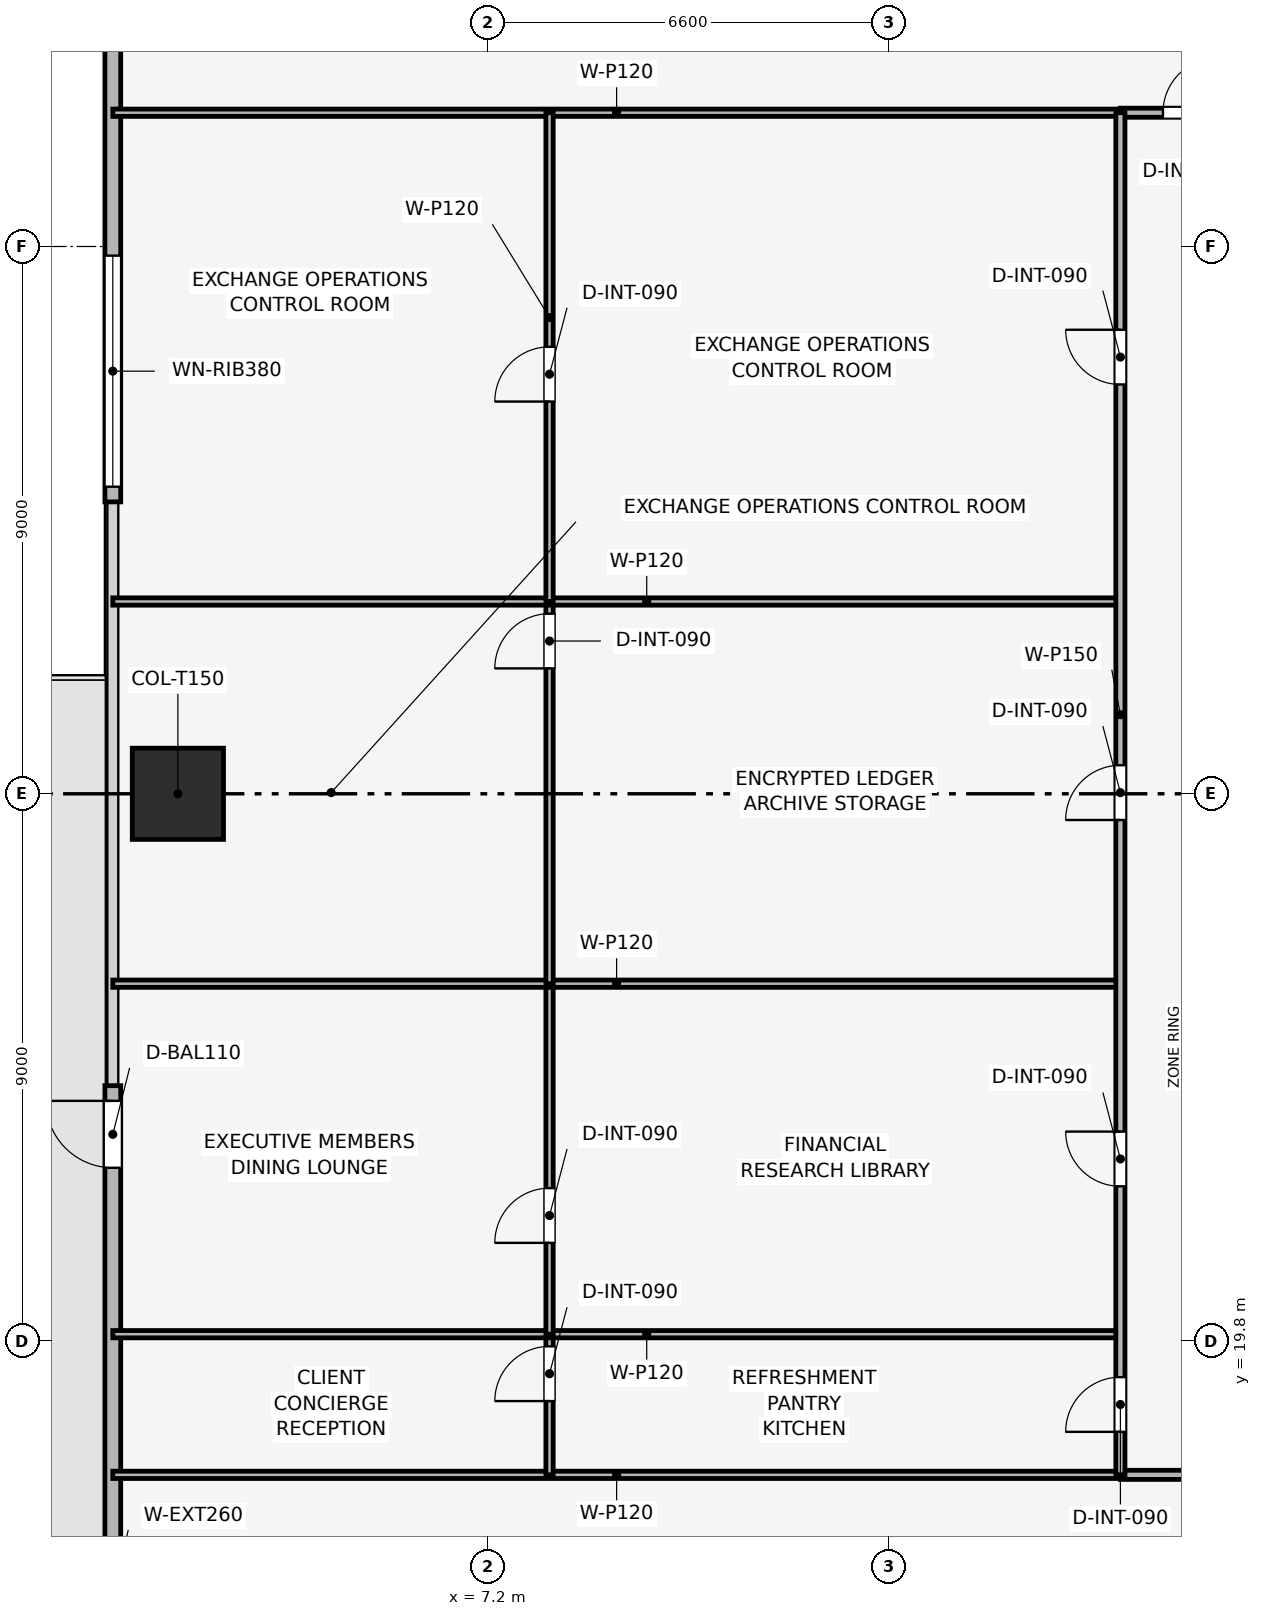
"""IFC4 building model, lengths in metres.
Left out: names, types, materials, properties, quantities, classifications, styles, units other than length and angle.
Written with IfcOpenShell. Run it as: python <this file> out.ifc"""

import sys

from ifc_helpers import new_model, si_unit, direction, frame, frame_2d, origin, origin_2d, place, context, subcontext, project, spatial, rectangle, extrude, element, fill, save


model = new_model("IFC4")
c1 = context("Model", 3, precision=1e-05, world=origin(), true_north=direction((0.0, 1.0)))
c2 = subcontext(c1, "Body", "Model", "MODEL_VIEW")
j1 = project(units=[si_unit("LENGTHUNIT", "METRE"), si_unit("PLANEANGLEUNIT", "RADIAN")], contexts=[c1])
p1 = place(None, origin())
s1 = spatial("IfcSite", under=j1, at=p1, CompositionType="ELEMENT")
p2 = place(p1, origin())
s2 = spatial("IfcBuilding", under=s1, at=p2, CompositionType="ELEMENT")
p3 = place(p2, frame((0.0, 0.0, 80.7)))
s3 = spatial("IfcBuildingStorey", under=s2, at=p3, CompositionType="ELEMENT", Elevation=80.7)
p4 = place(p3, frame((2.1, 28.8, 0.003), z_axis=(0.0, 0.0, 1.0), x_axis=(1.0, 0.0, 0.0)))
e1 = element("IfcColumn", 1, at=p4, inside=s3, PredefinedType="COLUMN", context=c2, shape_type="SweptSolid", body=[
    extrude(rectangle(XDim=1.5, YDim=1.5, at=origin_2d()), origin(), (0.0, 0.0, 1.0), 3.644),
])
p5 = place(p3, frame((1.03, 8.7, 0.0), z_axis=(0.0, 0.0, 1.0), x_axis=(0.0, 1.0, 0.0)))
e2 = element("IfcWall", 2, at=p5, inside=s3, PredefinedType="SOLIDWALL", context=c2, shape_type="SweptSolid", body=[
    extrude(rectangle(XDim=15.3, YDim=0.26, at=frame_2d((7.65, 0.0))), origin(), (0.0, 0.0, 1.0), 3.65),
])
p6 = place(p5, frame((13.95, 0.0, 0.0)))
e3 = element("IfcOpeningElement", 3, at=p6, cuts=e2, PredefinedType="OPENING", context=c2, shape_type="SweptSolid", body=[
    extrude(rectangle(XDim=1.1, YDim=2.2, at=frame_2d((0.55, 1.1))), frame((0.0, 0.14, 0.0), z_axis=(0.0, -1.0, 0.0), x_axis=(1.0, 0.0, 0.0)), (0.0, 0.0, 1.0), 0.28),
])
p7 = place(p3, frame((1.03, 33.6, 0.0), z_axis=(0.0, 0.0, 1.0), x_axis=(0.0, 1.0, 0.0)))
e4 = element("IfcWall", 4, at=p7, inside=s3, PredefinedType="SOLIDWALL", context=c2, shape_type="SweptSolid", body=[
    extrude(rectangle(XDim=15.3, YDim=0.26, at=frame_2d((7.65, 0.0))), origin(), (0.0, 0.0, 1.0), 3.65),
])
p8 = place(p7, frame((0.25, 0.0, 0.9)))
e5 = element("IfcOpeningElement", 5, at=p8, cuts=e4, PredefinedType="OPENING", context=c2, shape_type="SweptSolid", body=[
    extrude(rectangle(XDim=3.8, YDim=1.9, at=frame_2d((1.9, 0.95))), frame((0.0, 0.14, 0.0), z_axis=(0.0, -1.0, 0.0), x_axis=(1.0, 0.0, 0.0)), (0.0, 0.0, 1.0), 0.28),
])
for number, where, z_axis, x_axis in (
    (6, (1.03, 17.6, 0.0), (0.0, 0.0, 1.0), (1.0, 0.0, 0.0)),
    (7, (1.03, 40.0, 0.0), (0.0, 0.0, 1.0), (1.0, 0.0, 0.0)),
):
    element("IfcWall", number, at=place(p3, frame(where, z_axis=z_axis, x_axis=x_axis)), inside=s3, PredefinedType="PARTITIONING", context=c2, shape_type="SweptSolid", body=[
        extrude(rectangle(XDim=16.57, YDim=0.12, at=frame_2d((8.285, 0.0))), origin(), (0.0, 0.0, 1.0), 2.935),
    ])
p9 = place(p3, frame((8.212, 17.6, 0.0), z_axis=(0.0, 0.0, 1.0), x_axis=(0.0, 1.0, 0.0)))
e8 = element("IfcWall", 8, at=p9, inside=s3, PredefinedType="PARTITIONING", context=c2, shape_type="SweptSolid", body=[
    extrude(rectangle(XDim=2.313, YDim=0.12, at=frame_2d((1.156, 0.0))), origin(), (0.0, 0.0, 1.0), 3.65),
])
p10 = place(p9, frame((1.213, 0.0, 0.0)))
e9 = element("IfcOpeningElement", 9, at=p10, cuts=e8, PredefinedType="OPENING", context=c2, shape_type="SweptSolid", body=[
    extrude(rectangle(XDim=0.9, YDim=2.1, at=frame_2d((0.45, 1.05))), frame((0.0, 0.07, 0.0), z_axis=(0.0, -1.0, 0.0), x_axis=(1.0, 0.0, 0.0)), (0.0, 0.0, 1.0), 0.14),
])
p11 = place(p3, frame((1.03, 19.913, 0.0), z_axis=(0.0, 0.0, 1.0), x_axis=(1.0, 0.0, 0.0)))
e10 = element("IfcWall", 10, at=p11, inside=s3, PredefinedType="PARTITIONING", context=c2, shape_type="SweptSolid", body=[
    extrude(rectangle(XDim=16.57, YDim=0.12, at=frame_2d((8.285, 0.0))), origin(), (0.0, 0.0, 1.0), 2.935),
])
p12 = place(p3, frame((8.212, 19.913, 0.0), z_axis=(0.0, 0.0, 1.0), x_axis=(0.0, 1.0, 0.0)))
e11 = element("IfcWall", 11, at=p12, inside=s3, PredefinedType="PARTITIONING", context=c2, shape_type="SweptSolid", body=[
    extrude(rectangle(XDim=5.764, YDim=0.12, at=frame_2d((2.882, 0.0))), origin(), (0.0, 0.0, 1.0), 3.085),
])
p13 = place(p12, frame((1.502, 0.0, 0.0)))
e12 = element("IfcOpeningElement", 12, at=p13, cuts=e11, PredefinedType="OPENING", context=c2, shape_type="SweptSolid", body=[
    extrude(rectangle(XDim=0.9, YDim=2.1, at=frame_2d((0.45, 1.05))), frame((0.0, 0.07, 0.0), z_axis=(0.0, -1.0, 0.0), x_axis=(1.0, 0.0, 0.0)), (0.0, 0.0, 1.0), 0.14),
])
p14 = place(p3, frame((1.03, 25.677, 0.0), z_axis=(0.0, 0.0, 1.0), x_axis=(1.0, 0.0, 0.0)))
e13 = element("IfcWall", 13, at=p14, inside=s3, PredefinedType="PARTITIONING", context=c2, shape_type="SweptSolid", body=[
    extrude(rectangle(XDim=16.57, YDim=0.12, at=frame_2d((8.285, 0.0))), origin(), (0.0, 0.0, 1.0), 2.935),
])
p15 = place(p3, frame((8.212, 25.677, 0.0), z_axis=(0.0, 0.0, 1.0), x_axis=(0.0, 1.0, 0.0)))
e14 = element("IfcWall", 14, at=p15, inside=s3, PredefinedType="PARTITIONING", context=c2, shape_type="SweptSolid", body=[
    extrude(rectangle(XDim=6.285, YDim=0.12, at=frame_2d((3.143, 0.0))), origin(), (0.0, 0.0, 1.0), 3.085),
])
p16 = place(p15, frame((5.185, 0.0, 0.0)))
e15 = element("IfcOpeningElement", 15, at=p16, cuts=e14, PredefinedType="OPENING", context=c2, shape_type="SweptSolid", body=[
    extrude(rectangle(XDim=0.9, YDim=2.1, at=frame_2d((0.45, 1.05))), frame((0.0, 0.07, 0.0), z_axis=(0.0, -1.0, 0.0), x_axis=(1.0, 0.0, 0.0)), (0.0, 0.0, 1.0), 0.14),
])
p17 = place(p3, frame((1.03, 31.962, 0.0), z_axis=(0.0, 0.0, 1.0), x_axis=(1.0, 0.0, 0.0)))
e16 = element("IfcWall", 16, at=p17, inside=s3, PredefinedType="PARTITIONING", context=c2, shape_type="SweptSolid", body=[
    extrude(rectangle(XDim=16.57, YDim=0.12, at=frame_2d((8.285, 0.0))), origin(), (0.0, 0.0, 1.0), 2.935),
])
p18 = place(p3, frame((8.212, 31.962, 0.0), z_axis=(0.0, 0.0, 1.0), x_axis=(0.0, 1.0, 0.0)))
e17 = element("IfcWall", 17, at=p18, inside=s3, PredefinedType="PARTITIONING", context=c2, shape_type="SweptSolid", body=[
    extrude(rectangle(XDim=8.038, YDim=0.12, at=frame_2d((4.019, 0.0))), origin(), (0.0, 0.0, 1.0), 3.085),
])
p19 = place(p18, frame((3.288, 0.0, 0.0)))
e18 = element("IfcOpeningElement", 18, at=p19, cuts=e17, PredefinedType="OPENING", context=c2, shape_type="SweptSolid", body=[
    extrude(rectangle(XDim=0.9, YDim=2.1, at=frame_2d((0.45, 1.05))), frame((0.0, 0.07, 0.0), z_axis=(0.0, -1.0, 0.0), x_axis=(1.0, 0.0, 0.0)), (0.0, 0.0, 1.0), 0.14),
])
p20 = place(p3, frame((17.6, 17.6, 0.0), z_axis=(0.0, 0.0, 1.0), x_axis=(1.0, 0.0, 0.0)))
e19 = element("IfcWall", 19, at=p20, inside=s3, PredefinedType="PARTITIONING", context=c2, shape_type="SweptSolid", body=[
    extrude(rectangle(XDim=22.4, YDim=0.15, at=frame_2d((11.2, 0.0))), origin(), (0.0, 0.0, 1.0), 3.085),
])
p21 = place(p20, frame((2.4, 0.0, 0.0)))
e20 = element("IfcOpeningElement", 20, at=p21, cuts=e19, PredefinedType="OPENING", context=c2, shape_type="SweptSolid", body=[
    extrude(rectangle(XDim=0.9, YDim=2.1, at=frame_2d((0.45, 1.05))), frame((0.0, 0.085, 0.0), z_axis=(0.0, -1.0, 0.0), x_axis=(1.0, 0.0, 0.0)), (0.0, 0.0, 1.0), 0.17),
])
p22 = place(p20, frame((6.65, 0.0, 0.0)))
e21 = element("IfcOpeningElement", 21, at=p22, cuts=e19, PredefinedType="OPENING", context=c2, shape_type="SweptSolid", body=[
    extrude(rectangle(XDim=0.9, YDim=2.1, at=frame_2d((0.45, 1.05))), frame((0.0, 0.085, 0.0), z_axis=(0.0, -1.0, 0.0), x_axis=(1.0, 0.0, 0.0)), (0.0, 0.0, 1.0), 0.17),
])
p23 = place(p20, frame((9.55, 0.0, 0.0)))
e22 = element("IfcOpeningElement", 22, at=p23, cuts=e19, PredefinedType="OPENING", context=c2, shape_type="SweptSolid", body=[
    extrude(rectangle(XDim=0.9, YDim=2.1, at=frame_2d((0.45, 1.05))), frame((0.0, 0.085, 0.0), z_axis=(0.0, -1.0, 0.0), x_axis=(1.0, 0.0, 0.0)), (0.0, 0.0, 1.0), 0.17),
])
p24 = place(p20, frame((12.3, 0.0, 0.0)))
e23 = element("IfcOpeningElement", 23, at=p24, cuts=e19, PredefinedType="OPENING", context=c2, shape_type="SweptSolid", body=[
    extrude(rectangle(XDim=0.95, YDim=2.1, at=frame_2d((0.475, 1.05))), frame((0.0, 0.085, 0.0), z_axis=(0.0, -1.0, 0.0), x_axis=(1.0, 0.0, 0.0)), (0.0, 0.0, 1.0), 0.17),
])
p25 = place(p20, frame((17.8, 0.0, 0.0)))
e24 = element("IfcOpeningElement", 24, at=p25, cuts=e19, PredefinedType="OPENING", context=c2, shape_type="SweptSolid", body=[
    extrude(rectangle(XDim=0.9, YDim=2.1, at=frame_2d((0.45, 1.05))), frame((0.0, 0.085, 0.0), z_axis=(0.0, -1.0, 0.0), x_axis=(1.0, 0.0, 0.0)), (0.0, 0.0, 1.0), 0.17),
])
p26 = place(p3, frame((17.6, 40.0, 0.0), z_axis=(0.0, 0.0, 1.0), x_axis=(1.0, 0.0, 0.0)))
e25 = element("IfcWall", 25, at=p26, inside=s3, PredefinedType="PARTITIONING", context=c2, shape_type="SweptSolid", body=[
    extrude(rectangle(XDim=22.4, YDim=0.15, at=frame_2d((11.2, 0.0))), origin(), (0.0, 0.0, 1.0), 3.085),
])
p27 = place(p26, frame((0.7, 0.0, 0.0)))
e26 = element("IfcOpeningElement", 26, at=p27, cuts=e25, PredefinedType="OPENING", context=c2, shape_type="SweptSolid", body=[
    extrude(rectangle(XDim=0.9, YDim=2.1, at=frame_2d((0.45, 1.05))), frame((0.0, 0.085, 0.0), z_axis=(0.0, -1.0, 0.0), x_axis=(1.0, 0.0, 0.0)), (0.0, 0.0, 1.0), 0.17),
])
p28 = place(p26, frame((6.378, 0.0, 0.0)))
e27 = element("IfcOpeningElement", 27, at=p28, cuts=e25, PredefinedType="OPENING", context=c2, shape_type="SweptSolid", body=[
    extrude(rectangle(XDim=0.9, YDim=2.1, at=frame_2d((0.45, 1.05))), frame((0.0, 0.085, 0.0), z_axis=(0.0, -1.0, 0.0), x_axis=(1.0, 0.0, 0.0)), (0.0, 0.0, 1.0), 0.17),
])
p29 = place(p26, frame((16.428, 0.0, 0.0)))
e28 = element("IfcOpeningElement", 28, at=p29, cuts=e25, PredefinedType="OPENING", context=c2, shape_type="SweptSolid", body=[
    extrude(rectangle(XDim=0.9, YDim=2.1, at=frame_2d((0.45, 1.05))), frame((0.0, 0.085, 0.0), z_axis=(0.0, -1.0, 0.0), x_axis=(1.0, 0.0, 0.0)), (0.0, 0.0, 1.0), 0.17),
])
p30 = place(p3, frame((17.6, 17.6, 0.0), z_axis=(0.0, 0.0, 1.0), x_axis=(0.0, 1.0, 0.0)))
e29 = element("IfcWall", 29, at=p30, inside=s3, PredefinedType="PARTITIONING", context=c2, shape_type="SweptSolid", body=[
    extrude(rectangle(XDim=22.4, YDim=0.15, at=frame_2d((11.2, 0.0))), origin(), (0.0, 0.0, 1.0), 3.085),
])
p31 = place(p30, frame((0.707, 0.0, 0.0)))
e30 = element("IfcOpeningElement", 30, at=p31, cuts=e29, PredefinedType="OPENING", context=c2, shape_type="SweptSolid", body=[
    extrude(rectangle(XDim=0.9, YDim=2.1, at=frame_2d((0.45, 1.05))), frame((0.0, 0.085, 0.0), z_axis=(0.0, -1.0, 0.0), x_axis=(1.0, 0.0, 0.0)), (0.0, 0.0, 1.0), 0.17),
])
p32 = place(p30, frame((4.745, 0.0, 0.0)))
e31 = element("IfcOpeningElement", 31, at=p32, cuts=e29, PredefinedType="OPENING", context=c2, shape_type="SweptSolid", body=[
    extrude(rectangle(XDim=0.9, YDim=2.1, at=frame_2d((0.45, 1.05))), frame((0.0, 0.085, 0.0), z_axis=(0.0, -1.0, 0.0), x_axis=(1.0, 0.0, 0.0)), (0.0, 0.0, 1.0), 0.17),
])
p33 = place(p30, frame((10.769, 0.0, 0.0)))
e32 = element("IfcOpeningElement", 32, at=p33, cuts=e29, PredefinedType="OPENING", context=c2, shape_type="SweptSolid", body=[
    extrude(rectangle(XDim=0.9, YDim=2.1, at=frame_2d((0.45, 1.05))), frame((0.0, 0.085, 0.0), z_axis=(0.0, -1.0, 0.0), x_axis=(1.0, 0.0, 0.0)), (0.0, 0.0, 1.0), 0.17),
])
p34 = place(p30, frame((17.931, 0.0, 0.0)))
e33 = element("IfcOpeningElement", 33, at=p34, cuts=e29, PredefinedType="OPENING", context=c2, shape_type="SweptSolid", body=[
    extrude(rectangle(XDim=0.9, YDim=2.1, at=frame_2d((0.45, 1.05))), frame((0.0, 0.085, 0.0), z_axis=(0.0, -1.0, 0.0), x_axis=(1.0, 0.0, 0.0)), (0.0, 0.0, 1.0), 0.17),
])
p35 = place(p6, origin())
e34 = element("IfcDoor", 34, at=p35, inside=s3, OperationType="SINGLE_SWING_RIGHT", PredefinedType="DOOR", context=c2, shape_type="SweptSolid", body=[
    extrude(rectangle(XDim=1.1, YDim=2.2, at=frame_2d((0.55, 1.1))), frame((0.0, 0.025, 0.0), z_axis=(0.0, -1.0, 0.0), x_axis=(1.0, 0.0, 0.0)), (0.0, 0.0, 1.0), 0.05),
])
fill(e3, e34)
p36 = place(p8, origin())
e35 = element("IfcWindow", 35, at=p36, inside=s3, PartitioningType="SINGLE_PANEL", PredefinedType="WINDOW", context=c2, shape_type="SweptSolid", body=[
    extrude(rectangle(XDim=3.8, YDim=1.9, at=frame_2d((1.9, 0.95))), frame((0.0, 0.03, 0.0), z_axis=(0.0, -1.0, 0.0), x_axis=(1.0, 0.0, 0.0)), (0.0, 0.0, 1.0), 0.06),
])
fill(e5, e35)
p37 = place(p10, origin())
e36 = element("IfcDoor", 36, at=p37, inside=s3, OperationType="SINGLE_SWING_LEFT", PredefinedType="DOOR", context=c2, shape_type="SweptSolid", body=[
    extrude(rectangle(XDim=0.9, YDim=2.1, at=frame_2d((0.45, 1.05))), frame((0.0, 0.025, 0.0), z_axis=(0.0, -1.0, 0.0), x_axis=(1.0, 0.0, 0.0)), (0.0, 0.0, 1.0), 0.05),
])
fill(e9, e36)
p38 = place(p13, origin())
e37 = element("IfcDoor", 37, at=p38, inside=s3, OperationType="SINGLE_SWING_LEFT", PredefinedType="DOOR", context=c2, shape_type="SweptSolid", body=[
    extrude(rectangle(XDim=0.9, YDim=2.1, at=frame_2d((0.45, 1.05))), frame((0.0, 0.025, 0.0), z_axis=(0.0, -1.0, 0.0), x_axis=(1.0, 0.0, 0.0)), (0.0, 0.0, 1.0), 0.05),
])
fill(e12, e37)
p39 = place(p16, origin())
e38 = element("IfcDoor", 38, at=p39, inside=s3, OperationType="SINGLE_SWING_LEFT", PredefinedType="DOOR", context=c2, shape_type="SweptSolid", body=[
    extrude(rectangle(XDim=0.9, YDim=2.1, at=frame_2d((0.45, 1.05))), frame((0.0, 0.025, 0.0), z_axis=(0.0, -1.0, 0.0), x_axis=(1.0, 0.0, 0.0)), (0.0, 0.0, 1.0), 0.05),
])
fill(e15, e38)
p40 = place(p19, origin())
e39 = element("IfcDoor", 39, at=p40, inside=s3, OperationType="SINGLE_SWING_LEFT", PredefinedType="DOOR", context=c2, shape_type="SweptSolid", body=[
    extrude(rectangle(XDim=0.9, YDim=2.1, at=frame_2d((0.45, 1.05))), frame((0.0, 0.025, 0.0), z_axis=(0.0, -1.0, 0.0), x_axis=(1.0, 0.0, 0.0)), (0.0, 0.0, 1.0), 0.05),
])
fill(e18, e39)
p41 = place(p27, origin())
e40 = element("IfcDoor", 40, at=p41, inside=s3, OperationType="SINGLE_SWING_RIGHT", PredefinedType="DOOR", context=c2, shape_type="SweptSolid", body=[
    extrude(rectangle(XDim=0.9, YDim=2.1, at=frame_2d((0.45, 1.05))), frame((0.0, 0.025, 0.0), z_axis=(0.0, -1.0, 0.0), x_axis=(1.0, 0.0, 0.0)), (0.0, 0.0, 1.0), 0.05),
])
fill(e26, e40)
p42 = place(p31, origin())
e41 = element("IfcDoor", 41, at=p42, inside=s3, OperationType="SINGLE_SWING_LEFT", PredefinedType="DOOR", context=c2, shape_type="SweptSolid", body=[
    extrude(rectangle(XDim=0.9, YDim=2.1, at=frame_2d((0.45, 1.05))), frame((0.0, 0.025, 0.0), z_axis=(0.0, -1.0, 0.0), x_axis=(1.0, 0.0, 0.0)), (0.0, 0.0, 1.0), 0.05),
])
fill(e30, e41)
p43 = place(p32, origin())
e42 = element("IfcDoor", 42, at=p43, inside=s3, OperationType="SINGLE_SWING_RIGHT", PredefinedType="DOOR", context=c2, shape_type="SweptSolid", body=[
    extrude(rectangle(XDim=0.9, YDim=2.1, at=frame_2d((0.45, 1.05))), frame((0.0, 0.025, 0.0), z_axis=(0.0, -1.0, 0.0), x_axis=(1.0, 0.0, 0.0)), (0.0, 0.0, 1.0), 0.05),
])
fill(e31, e42)
p44 = place(p33, origin())
e43 = element("IfcDoor", 43, at=p44, inside=s3, OperationType="SINGLE_SWING_LEFT", PredefinedType="DOOR", context=c2, shape_type="SweptSolid", body=[
    extrude(rectangle(XDim=0.9, YDim=2.1, at=frame_2d((0.45, 1.05))), frame((0.0, 0.025, 0.0), z_axis=(0.0, -1.0, 0.0), x_axis=(1.0, 0.0, 0.0)), (0.0, 0.0, 1.0), 0.05),
])
fill(e32, e43)
p45 = place(p34, origin())
e44 = element("IfcDoor", 44, at=p45, inside=s3, OperationType="SINGLE_SWING_RIGHT", PredefinedType="DOOR", context=c2, shape_type="SweptSolid", body=[
    extrude(rectangle(XDim=0.9, YDim=2.1, at=frame_2d((0.45, 1.05))), frame((0.0, 0.025, 0.0), z_axis=(0.0, -1.0, 0.0), x_axis=(1.0, 0.0, 0.0)), (0.0, 0.0, 1.0), 0.05),
])
fill(e33, e44)
save(model, sys.argv[1])
